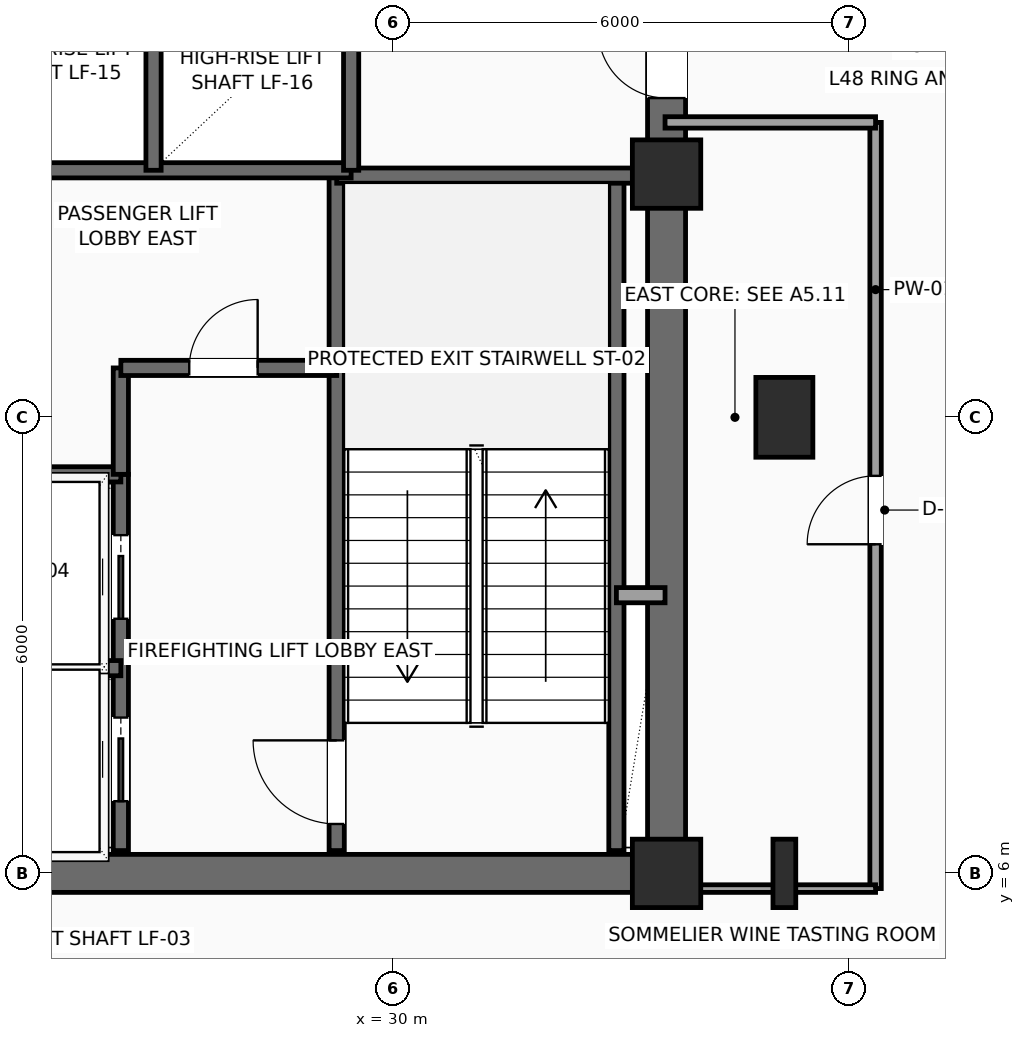
"""IFC4 building model, lengths in metres.
Left out: names, types, materials, properties, quantities, classifications, styles, units other than length and angle.
Written with IfcOpenShell. Run it as: python <this file> out.ifc"""

import sys

from ifc_helpers import new_model, si_unit, direction, frame, frame_2d, origin, origin_2d, place, context, subcontext, project, spatial, rectangle, i_section, extrude, element, fill, save


model = new_model("IFC4")
c1 = context("Model", 3, precision=1e-05, world=origin(), true_north=direction((0.0, 1.0)))
c2 = subcontext(c1, "Body", "Model", "MODEL_VIEW")
j1 = project(units=[si_unit("LENGTHUNIT", "METRE"), si_unit("PLANEANGLEUNIT", "RADIAN")], contexts=[c1])
p1 = place(None, origin())
s1 = spatial("IfcSite", under=j1, at=p1, CompositionType="ELEMENT")
p2 = place(p1, origin())
s2 = spatial("IfcBuilding", under=s1, at=p2, CompositionType="ELEMENT")
p3 = place(p2, frame((0.0, 0.0, 195.45)))
s3 = spatial("IfcBuildingStorey", under=s2, at=p3, CompositionType="ELEMENT", Elevation=195.45)
for number, where, z_axis, x_axis in (
    (1, (33.6, 6.0, 0.0), (0.0, 0.0, 1.0), (1.0, 0.0, 0.0)),
    (2, (33.6, 15.2, 0.0), (0.0, 0.0, 1.0), (1.0, 0.0, 0.0)),
):
    element("IfcColumn", number, at=place(p3, frame(where, z_axis=z_axis, x_axis=x_axis)), inside=s3, PredefinedType="COLUMN", context=c2, shape_type="SweptSolid", body=[
        extrude(rectangle(XDim=0.9, YDim=0.9, at=origin_2d()), origin(), (0.0, 0.0, 1.0), 3.75),
    ])
p4 = place(p3, frame((35.15, 6.0, 0.0), z_axis=(0.0, 0.0, 1.0), x_axis=(1.0, 0.0, 0.0)))
e3 = element("IfcColumn", 3, at=p4, inside=s3, PredefinedType="COLUMN", context=c2, shape_type="SweptSolid", body=[
    extrude(i_section(OverallWidth=0.3, OverallDepth=0.9, WebThickness=0.019, FlangeThickness=0.035, FilletRadius=0.03, at=origin_2d()), origin(), (0.0, 0.0, 1.0), 3.75),
])
p5 = place(p3, frame((35.15, 12.0, 0.0), z_axis=(0.0, 0.0, 1.0), x_axis=(1.0, 0.0, 0.0)))
e4 = element("IfcColumn", 4, at=p5, inside=s3, PredefinedType="COLUMN", context=c2, shape_type="SweptSolid", body=[
    extrude(rectangle(XDim=0.75, YDim=1.05, at=origin_2d()), origin(), (0.0, 0.0, 1.0), 3.75),
])
p6 = place(p3, frame((24.0, 6.0, 0.0), z_axis=(0.0, 0.0, 1.0), x_axis=(1.0, 0.0, 0.0)))
e5 = element("IfcWall", 5, at=p6, inside=s3, PredefinedType="SHEAR", context=c2, shape_type="SweptSolid", body=[
    extrude(rectangle(XDim=9.6, YDim=0.5, at=frame_2d((4.8, 0.0))), origin(), (0.0, 0.0, 1.0), 3.475),
])
p7 = place(p3, frame((33.6, 6.0, 0.0), z_axis=(0.0, 0.0, 1.0), x_axis=(0.0, 1.0, 0.0)))
e6 = element("IfcWall", 6, at=p7, inside=s3, PredefinedType="SHEAR", context=c2, shape_type="SweptSolid", body=[
    extrude(rectangle(XDim=12.0, YDim=0.5, at=frame_2d((6.0, 0.0))), origin(), (0.0, 0.0, 1.0), 3.475),
])
p8 = place(p7, frame((10.2, 0.0, 0.0)))
e7 = element("IfcOpeningElement", 7, at=p8, cuts=e6, PredefinedType="OPENING", context=c2, shape_type="SweptSolid", body=[
    extrude(rectangle(XDim=0.9, YDim=2.15, at=frame_2d((0.45, 1.075))), frame((0.0, 0.26, 0.0), z_axis=(0.0, -1.0, 0.0), x_axis=(1.0, 0.0, 0.0)), (0.0, 0.0, 1.0), 0.52),
])
p9 = place(p3, frame((29.26, 6.3, 0.0), z_axis=(0.0, 0.0, 1.0), x_axis=(0.0, 1.0, 0.0)))
e8 = element("IfcWall", 8, at=p9, inside=s3, PredefinedType="SHEAR", context=c2, shape_type="SweptSolid", body=[
    extrude(rectangle(XDim=8.88, YDim=0.2, at=frame_2d((4.44, 0.0))), origin(), (0.0, 0.0, 1.0), 3.475),
])
p10 = place(p9, frame((0.35, 0.0, 0.0)))
e9 = element("IfcOpeningElement", 9, at=p10, cuts=e8, PredefinedType="OPENING", context=c2, shape_type="SweptSolid", body=[
    extrude(rectangle(XDim=1.1, YDim=2.2, at=frame_2d((0.55, 1.1))), frame((0.0, 0.11, 0.0), z_axis=(0.0, -1.0, 0.0), x_axis=(1.0, 0.0, 0.0)), (0.0, 0.0, 1.0), 0.22),
])
p11 = place(p3, frame((32.94, 6.3, 0.0), z_axis=(0.0, 0.0, 1.0), x_axis=(0.0, 1.0, 0.0)))
e10 = element("IfcWall", 10, at=p11, inside=s3, PredefinedType="SHEAR", context=c2, shape_type="SweptSolid", body=[
    extrude(rectangle(XDim=8.88, YDim=0.2, at=frame_2d((4.44, 0.0))), origin(), (0.0, 0.0, 1.0), 3.475),
])
p12 = place(p3, frame((29.26, 15.18, 0.0), z_axis=(0.0, 0.0, 1.0), x_axis=(1.0, 0.0, 0.0)))
e11 = element("IfcWall", 11, at=p12, inside=s3, PredefinedType="SHEAR", context=c2, shape_type="SweptSolid", body=[
    extrude(rectangle(XDim=4.04, YDim=0.2, at=frame_2d((2.02, 0.0))), origin(), (0.0, 0.0, 1.0), 3.475),
])
p13 = place(p3, frame((26.42, 6.3, 0.0), z_axis=(0.0, 0.0, 1.0), x_axis=(0.0, 1.0, 0.0)))
e12 = element("IfcWall", 12, at=p13, inside=s3, PredefinedType="SHEAR", context=c2, shape_type="SweptSolid", body=[
    extrude(rectangle(XDim=4.95, YDim=0.2, at=frame_2d((2.475, 0.0))), origin(), (0.0, 0.0, 1.0), 3.475),
])
p14 = place(p13, frame((0.65, 0.0, 0.0)))
e13 = element("IfcOpeningElement", 13, at=p14, cuts=e12, PredefinedType="OPENING", context=c2, shape_type="SweptSolid", body=[
    extrude(rectangle(XDim=1.1, YDim=2.2, at=frame_2d((0.55, 1.1))), frame((0.0, 0.11, 0.0), z_axis=(0.0, -1.0, 0.0), x_axis=(1.0, 0.0, 0.0)), (0.0, 0.0, 1.0), 0.22),
])
p15 = place(p13, frame((3.05, 0.0, 0.0)))
e14 = element("IfcOpeningElement", 14, at=p15, cuts=e12, PredefinedType="OPENING", context=c2, shape_type="SweptSolid", body=[
    extrude(rectangle(XDim=1.1, YDim=2.2, at=frame_2d((0.55, 1.1))), frame((0.0, 0.11, 0.0), z_axis=(0.0, -1.0, 0.0), x_axis=(1.0, 0.0, 0.0)), (0.0, 0.0, 1.0), 0.22),
])
for number, where, z_axis, x_axis in (
    (15, (24.25, 8.7, 0.0), (0.0, 0.0, 1.0), (1.0, 0.0, 0.0)),
    (16, (24.25, 11.25, 0.0), (0.0, 0.0, 1.0), (1.0, 0.0, 0.0)),
):
    element("IfcWall", number, at=place(p3, frame(where, z_axis=z_axis, x_axis=x_axis)), inside=s3, PredefinedType="SHEAR", context=c2, shape_type="SweptSolid", body=[
        extrude(rectangle(XDim=2.17, YDim=0.2, at=frame_2d((1.085, 0.0))), origin(), (0.0, 0.0, 1.0), 3.475),
    ])
p16 = place(p3, frame((26.42, 11.25, 0.0), z_axis=(0.0, 0.0, 1.0), x_axis=(0.0, 1.0, 0.0)))
e17 = element("IfcWall", 17, at=p16, inside=s3, PredefinedType="SHEAR", context=c2, shape_type="SweptSolid", body=[
    extrude(rectangle(XDim=1.4, YDim=0.2, at=frame_2d((0.7, 0.0))), origin(), (0.0, 0.0, 1.0), 3.475),
])
p17 = place(p3, frame((26.42, 12.65, 0.0), z_axis=(0.0, 0.0, 1.0), x_axis=(1.0, 0.0, 0.0)))
e18 = element("IfcWall", 18, at=p17, inside=s3, PredefinedType="SHEAR", context=c2, shape_type="SweptSolid", body=[
    extrude(rectangle(XDim=2.84, YDim=0.2, at=frame_2d((1.42, 0.0))), origin(), (0.0, 0.0, 1.0), 3.475),
])
p18 = place(p17, frame((0.9, 0.0, 0.0)))
e19 = element("IfcOpeningElement", 19, at=p18, cuts=e18, PredefinedType="OPENING", context=c2, shape_type="SweptSolid", body=[
    extrude(rectangle(XDim=0.9, YDim=2.15, at=frame_2d((0.45, 1.075))), frame((0.0, 0.11, 0.0), z_axis=(0.0, -1.0, 0.0), x_axis=(1.0, 0.0, 0.0)), (0.0, 0.0, 1.0), 0.22),
])
p19 = place(p3, frame((32.94, 9.66, 0.0), z_axis=(0.0, 0.0, 1.0), x_axis=(1.0, 0.0, 0.0)))
e20 = element("IfcWall", 20, at=p19, inside=s3, PredefinedType="SOLIDWALL", context=c2, shape_type="SweptSolid", body=[
    extrude(rectangle(XDim=0.64, YDim=0.2, at=frame_2d((0.32, 0.0))), origin(), (0.0, 0.0, 1.0), 3.475),
])
p20 = place(p3, frame((24.25, 15.25, 0.0), z_axis=(0.0, 0.0, 1.0), x_axis=(1.0, 0.0, 0.0)))
e21 = element("IfcWall", 21, at=p20, inside=s3, PredefinedType="SHEAR", context=c2, shape_type="SweptSolid", body=[
    extrude(rectangle(XDim=5.2, YDim=0.2, at=frame_2d((2.6, 0.0))), origin(), (0.0, 0.0, 1.0), 3.475),
])
p21 = place(p3, frame((26.85, 15.25, 0.0), z_axis=(0.0, 0.0, 1.0), x_axis=(0.0, 1.0, 0.0)))
e22 = element("IfcWall", 22, at=p21, inside=s3, PredefinedType="SHEAR", context=c2, shape_type="SweptSolid", body=[
    extrude(rectangle(XDim=2.4, YDim=0.2, at=frame_2d((1.2, 0.0))), origin(), (0.0, 0.0, 1.0), 3.475),
])
p22 = place(p3, frame((29.45, 15.25, 0.0), z_axis=(0.0, 0.0, 1.0), x_axis=(0.0, 1.0, 0.0)))
e23 = element("IfcWall", 23, at=p22, inside=s3, PredefinedType="SHEAR", context=c2, shape_type="SweptSolid", body=[
    extrude(rectangle(XDim=2.45, YDim=0.2, at=frame_2d((1.225, 0.0))), origin(), (0.0, 0.0, 1.0), 3.475),
])
p23 = place(p3, frame((36.35, 5.8, 0.0), z_axis=(0.0, 0.0, 1.0), x_axis=(0.0, 1.0, 0.0)))
e24 = element("IfcWall", 24, at=p23, inside=s3, PredefinedType="PARTITIONING", context=c2, shape_type="SweptSolid", body=[
    extrude(rectangle(XDim=10.08, YDim=0.15, at=frame_2d((5.04, 0.0))), origin(), (0.0, 0.0, 1.0), 3.475),
])
p24 = place(p23, frame((4.53, 0.0, 0.0)))
e25 = element("IfcOpeningElement", 25, at=p24, cuts=e24, PredefinedType="OPENING", context=c2, shape_type="SweptSolid", body=[
    extrude(rectangle(XDim=0.9, YDim=2.1, at=frame_2d((0.45, 1.05))), frame((0.0, 0.085, 0.0), z_axis=(0.0, -1.0, 0.0), x_axis=(1.0, 0.0, 0.0)), (0.0, 0.0, 1.0), 0.17),
])
p25 = place(p3, frame((36.35, 15.88, 0.0), z_axis=(0.0, 0.0, 1.0), x_axis=(-1.0, 0.0, 0.0)))
e26 = element("IfcWall", 26, at=p25, inside=s3, PredefinedType="PARTITIONING", context=c2, shape_type="SweptSolid", body=[
    extrude(rectangle(XDim=2.77, YDim=0.15, at=frame_2d((1.385, 0.0))), origin(), (0.0, 0.0, 1.0), 3.475),
])
p26 = place(p3, frame((33.65, 5.8, 0.0), z_axis=(0.0, 0.0, 1.0), x_axis=(1.0, 0.0, 0.0)))
e27 = element("IfcWall", 27, at=p26, inside=s3, PredefinedType="PARTITIONING", context=c2, shape_type="SweptSolid", body=[
    extrude(rectangle(XDim=2.7, YDim=0.1, at=frame_2d((1.35, 0.0))), origin(), (0.0, 0.0, 1.0), 3.067),
])
p27 = place(p8, origin())
e28 = element("IfcDoor", 28, at=p27, inside=s3, OperationType="SINGLE_SWING_RIGHT", PredefinedType="DOOR", context=c2, shape_type="SweptSolid", body=[
    extrude(rectangle(XDim=0.9, YDim=2.15, at=frame_2d((0.45, 1.075))), frame((0.0, 0.025, 0.0), z_axis=(0.0, -1.0, 0.0), x_axis=(1.0, 0.0, 0.0)), (0.0, 0.0, 1.0), 0.05),
])
fill(e7, e28)
p28 = place(p10, origin())
e29 = element("IfcDoor", 29, at=p28, inside=s3, OperationType="SINGLE_SWING_RIGHT", PredefinedType="DOOR", context=c2, shape_type="SweptSolid", body=[
    extrude(rectangle(XDim=1.1, YDim=2.2, at=frame_2d((0.55, 1.1))), frame((0.0, 0.025, 0.0), z_axis=(0.0, -1.0, 0.0), x_axis=(1.0, 0.0, 0.0)), (0.0, 0.0, 1.0), 0.05),
])
fill(e9, e29)
p29 = place(p14, origin())
e30 = element("IfcDoor", 30, at=p29, inside=s3, OperationType="SLIDING_TO_LEFT", PredefinedType="DOOR", context=c2, shape_type="SweptSolid", body=[
    extrude(rectangle(XDim=1.1, YDim=2.2, at=frame_2d((0.55, 1.1))), frame((0.0, 0.025, 0.0), z_axis=(0.0, -1.0, 0.0), x_axis=(1.0, 0.0, 0.0)), (0.0, 0.0, 1.0), 0.05),
])
fill(e13, e30)
p30 = place(p15, origin())
e31 = element("IfcDoor", 31, at=p30, inside=s3, OperationType="SLIDING_TO_LEFT", PredefinedType="DOOR", context=c2, shape_type="SweptSolid", body=[
    extrude(rectangle(XDim=1.1, YDim=2.2, at=frame_2d((0.55, 1.1))), frame((0.0, 0.025, 0.0), z_axis=(0.0, -1.0, 0.0), x_axis=(1.0, 0.0, 0.0)), (0.0, 0.0, 1.0), 0.05),
])
fill(e14, e31)
p31 = place(p18, origin())
e32 = element("IfcDoor", 32, at=p31, inside=s3, OperationType="SINGLE_SWING_RIGHT", PredefinedType="DOOR", context=c2, shape_type="SweptSolid", body=[
    extrude(rectangle(XDim=0.9, YDim=2.15, at=frame_2d((0.45, 1.075))), frame((0.0, 0.025, 0.0), z_axis=(0.0, -1.0, 0.0), x_axis=(1.0, 0.0, 0.0)), (0.0, 0.0, 1.0), 0.05),
])
fill(e19, e32)
p32 = place(p24, origin())
e33 = element("IfcDoor", 33, at=p32, inside=s3, OperationType="SINGLE_SWING_LEFT", PredefinedType="DOOR", context=c2, shape_type="SweptSolid", body=[
    extrude(rectangle(XDim=0.9, YDim=2.1, at=frame_2d((0.45, 1.05))), frame((0.0, 0.025, 0.0), z_axis=(0.0, -1.0, 0.0), x_axis=(1.0, 0.0, 0.0)), (0.0, 0.0, 1.0), 0.05),
])
fill(e25, e33)
save(model, sys.argv[1])
